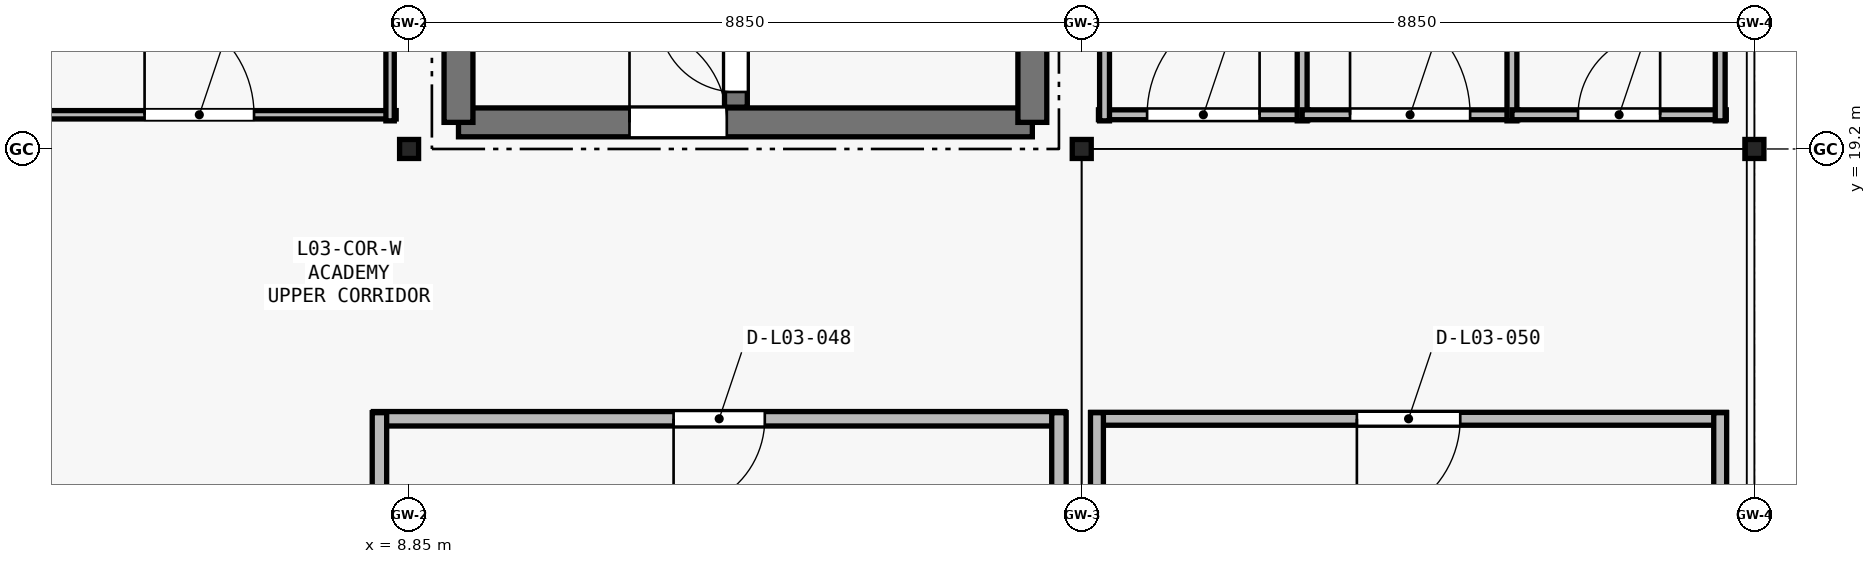
"""IFC4 building model, lengths in metres.
Left out: names, types, materials, properties, quantities, classifications, styles, units other than length and angle.
Written with IfcOpenShell. Run it as: python <this file> out.ifc"""

import sys

from ifc_helpers import new_model, si_unit, direction, frame, frame_2d, origin, origin_2d, place, context, subcontext, project, spatial, rectangle, i_section, extrude, element, fill, save


model = new_model("IFC4")
c1 = context("Model", 3, precision=1e-05, world=origin(), true_north=direction((0.0, 1.0)))
c2 = subcontext(c1, "Body", "Model", "MODEL_VIEW")
j1 = project(units=[si_unit("LENGTHUNIT", "METRE"), si_unit("PLANEANGLEUNIT", "RADIAN")], contexts=[c1])
p1 = place(None, origin())
s1 = spatial("IfcSite", under=j1, at=p1, CompositionType="ELEMENT")
p2 = place(p1, origin())
s2 = spatial("IfcBuilding", under=s1, at=p2, CompositionType="ELEMENT")
p3 = place(p2, frame((0.0, 0.0, 15.0)))
s3 = spatial("IfcBuildingStorey", under=s2, at=p3, CompositionType="ELEMENT", Elevation=15.0)
for number, where, z_axis, x_axis in (
    (1, (8.85, 19.2, 0.0), (0.0, 0.0, 1.0), (1.0, 0.0, 0.0)),
    (2, (17.7, 19.2, 0.0), (0.0, 0.0, 1.0), (1.0, 0.0, 0.0)),
    (3, (26.55, 19.2, 0.0), (0.0, 0.0, 1.0), (1.0, 0.0, 0.0)),
):
    element("IfcColumn", number, at=place(p3, frame(where, z_axis=z_axis, x_axis=x_axis)), inside=s3, PredefinedType="COLUMN", context=c2, shape_type="SweptSolid", body=[
        extrude(i_section(OverallWidth=0.25, OverallDepth=0.25, WebThickness=0.009, FlangeThickness=0.014, FilletRadius=0.016, at=origin_2d()), origin(), (0.0, 0.0, 1.0), 4.2),
    ])
p4 = place(p3, frame((9.5, 19.55, 0.0), z_axis=(0.0, 0.0, 1.0), x_axis=(1.0, 0.0, 0.0)))
e4 = element("IfcWall", 4, at=p4, inside=s3, PredefinedType="SHEAR", context=c2, shape_type="SweptSolid", body=[
    extrude(rectangle(XDim=7.55, YDim=0.38, at=frame_2d((3.775, 0.0))), origin(), (0.0, 0.0, 1.0), 4.2),
])
p5 = place(p4, frame((2.25, 0.0, 0.0)))
e5 = element("IfcOpeningElement", 5, at=p5, cuts=e4, PredefinedType="OPENING", context=c2, shape_type="SweptSolid", body=[
    extrude(rectangle(XDim=1.28, YDim=2.15, at=frame_2d((0.64, 1.075))), frame((0.0, 0.2, 0.0), z_axis=(0.0, -1.0, 0.0), x_axis=(1.0, 0.0, 0.0)), (0.0, 0.0, 1.0), 0.4),
])
for number, where, z_axis, x_axis in (
    (6, (9.5, 28.35, 0.0), (0.0, 0.0, 1.0), (0.0, -1.0, 0.0)),
    (7, (17.05, 19.55, 0.0), (0.0, 0.0, 1.0), (0.0, 1.0, 0.0)),
):
    element("IfcWall", number, at=place(p3, frame(where, z_axis=z_axis, x_axis=x_axis)), inside=s3, PredefinedType="SHEAR", context=c2, shape_type="SweptSolid", body=[
        extrude(rectangle(XDim=8.8, YDim=0.38, at=frame_2d((4.4, 0.0))), origin(), (0.0, 0.0, 1.0), 4.2),
    ])
p6 = place(p3, frame((13.15, 19.75, 0.0), z_axis=(0.0, 0.0, 1.0), x_axis=(0.0, 1.0, 0.0)))
e8 = element("IfcWall", 8, at=p6, inside=s3, PredefinedType="SHEAR", context=c2, shape_type="SweptSolid", body=[
    extrude(rectangle(XDim=8.4, YDim=0.3, at=frame_2d((4.2, 0.0))), origin(), (0.0, 0.0, 1.0), 4.2),
])
p7 = place(p6, frame((0.2, 0.0, 0.0)))
e9 = element("IfcOpeningElement", 9, at=p7, cuts=e8, PredefinedType="OPENING", context=c2, shape_type="SweptSolid", body=[
    extrude(rectangle(XDim=1.02, YDim=2.1, at=frame_2d((0.51, 1.05))), frame((0.0, 0.16, 0.0), z_axis=(0.0, -1.0, 0.0), x_axis=(1.0, 0.0, 0.0)), (0.0, 0.0, 1.0), 0.32),
])
p8 = place(p3, frame((17.92, 19.65, 0.0), z_axis=(0.0, 0.0, 1.0), x_axis=(1.0, 0.0, 0.0)))
e10 = element("IfcWall", 10, at=p8, inside=s3, PredefinedType="PARTITIONING", context=c2, shape_type="SweptSolid", body=[
    extrude(rectangle(XDim=2.76, YDim=0.13, at=frame_2d((1.38, 0.0))), origin(), (0.0, 0.0, 1.0), 3.72),
])
p9 = place(p8, frame((0.64, 0.0, 0.0)))
e11 = element("IfcOpeningElement", 11, at=p9, cuts=e10, PredefinedType="OPENING", context=c2, shape_type="SweptSolid", body=[
    extrude(rectangle(XDim=1.48, YDim=2.36, at=frame_2d((0.74, 1.18))), frame((0.0, 0.075, 0.0), z_axis=(0.0, -1.0, 0.0), x_axis=(1.0, 0.0, 0.0)), (0.0, 0.0, 1.0), 0.15),
])
p10 = place(p3, frame((20.6, 19.57, 0.0), z_axis=(0.0, 0.0, 1.0), x_axis=(0.0, 1.0, 0.0)))
e12 = element("IfcWall", 12, at=p10, inside=s3, PredefinedType="PARTITIONING", context=c2, shape_type="SweptSolid", body=[
    extrude(rectangle(XDim=4.51, YDim=0.13, at=frame_2d((2.255, 0.0))), origin(), (0.0, 0.0, 1.0), 3.55),
])
p11 = place(p3, frame((18.0, 24.08, 0.0), z_axis=(0.0, 0.0, 1.0), x_axis=(0.0, -1.0, 0.0)))
e13 = element("IfcWall", 13, at=p11, inside=s3, PredefinedType="PARTITIONING", context=c2, shape_type="SweptSolid", body=[
    extrude(rectangle(XDim=4.51, YDim=0.13, at=frame_2d((2.255, 0.0))), origin(), (0.0, 0.0, 1.0), 3.72),
])
p12 = place(p3, frame((20.6, 19.65, 0.0), z_axis=(0.0, 0.0, 1.0), x_axis=(1.0, 0.0, 0.0)))
e14 = element("IfcWall", 14, at=p12, inside=s3, PredefinedType="PARTITIONING", context=c2, shape_type="SweptSolid", body=[
    extrude(rectangle(XDim=2.84, YDim=0.13, at=frame_2d((1.42, 0.0))), origin(), (0.0, 0.0, 1.0), 3.72),
])
p13 = place(p12, frame((0.63, 0.0, 0.0)))
e15 = element("IfcOpeningElement", 15, at=p13, cuts=e14, PredefinedType="OPENING", context=c2, shape_type="SweptSolid", body=[
    extrude(rectangle(XDim=1.58, YDim=2.36, at=frame_2d((0.79, 1.18))), frame((0.0, 0.075, 0.0), z_axis=(0.0, -1.0, 0.0), x_axis=(1.0, 0.0, 0.0)), (0.0, 0.0, 1.0), 0.15),
])
p14 = place(p3, frame((23.36, 19.57, 0.0), z_axis=(0.0, 0.0, 1.0), x_axis=(0.0, 1.0, 0.0)))
e16 = element("IfcWall", 16, at=p14, inside=s3, PredefinedType="PARTITIONING", context=c2, shape_type="SweptSolid", body=[
    extrude(rectangle(XDim=4.51, YDim=0.13, at=frame_2d((2.255, 0.0))), origin(), (0.0, 0.0, 1.0), 3.72),
])
p15 = place(p3, frame((23.36, 19.65, 0.0), z_axis=(0.0, 0.0, 1.0), x_axis=(1.0, 0.0, 0.0)))
e17 = element("IfcWall", 17, at=p15, inside=s3, PredefinedType="PARTITIONING", context=c2, shape_type="SweptSolid", body=[
    extrude(rectangle(XDim=2.82, YDim=0.13, at=frame_2d((1.41, 0.0))), origin(), (0.0, 0.0, 1.0), 3.72),
])
p16 = place(p15, frame((0.87, 0.0, 0.0)))
e18 = element("IfcOpeningElement", 18, at=p16, cuts=e17, PredefinedType="OPENING", context=c2, shape_type="SweptSolid", body=[
    extrude(rectangle(XDim=1.08, YDim=2.22, at=frame_2d((0.54, 1.11))), frame((0.0, 0.075, 0.0), z_axis=(0.0, -1.0, 0.0), x_axis=(1.0, 0.0, 0.0)), (0.0, 0.0, 1.0), 0.15),
])
p17 = place(p3, frame((26.1, 19.57, 0.0), z_axis=(0.0, 0.0, 1.0), x_axis=(0.0, 1.0, 0.0)))
e19 = element("IfcWall", 19, at=p17, inside=s3, PredefinedType="PARTITIONING", context=c2, shape_type="SweptSolid", body=[
    extrude(rectangle(XDim=4.51, YDim=0.13, at=frame_2d((2.255, 0.0))), origin(), (0.0, 0.0, 1.0), 3.72),
])
p18 = place(p3, frame((17.48, 15.65, 0.0), z_axis=(0.0, 0.0, 1.0), x_axis=(-1.0, 0.0, 0.0)))
e20 = element("IfcWall", 20, at=p18, inside=s3, PredefinedType="PARTITIONING", context=c2, shape_type="SweptSolid", body=[
    extrude(rectangle(XDim=9.1, YDim=0.19, at=frame_2d((4.55, 0.0))), origin(), (0.0, 0.0, 1.0), 3.72),
])
p19 = place(p18, frame((3.95, 0.0, 0.0)))
e21 = element("IfcOpeningElement", 21, at=p19, cuts=e20, PredefinedType="OPENING", context=c2, shape_type="SweptSolid", body=[
    extrude(rectangle(XDim=1.2, YDim=2.1, at=frame_2d((0.6, 1.05))), frame((0.0, 0.105, 0.0), z_axis=(0.0, -1.0, 0.0), x_axis=(1.0, 0.0, 0.0)), (0.0, 0.0, 1.0), 0.21),
])
for number, where, z_axis, x_axis in (
    (22, (8.46, 15.73, 0.0), (0.0, 0.0, 1.0), (0.0, -1.0, 0.0)),
    (23, (17.4, 9.72, 0.0), (0.0, 0.0, 1.0), (0.0, 1.0, 0.0)),
):
    element("IfcWall", number, at=place(p3, frame(where, z_axis=z_axis, x_axis=x_axis)), inside=s3, PredefinedType="PARTITIONING", context=c2, shape_type="SweptSolid", body=[
        extrude(rectangle(XDim=6.01, YDim=0.19, at=frame_2d((3.005, 0.0))), origin(), (0.0, 0.0, 1.0), 3.72),
    ])
p20 = place(p3, frame((26.18, 15.65, 0.0), z_axis=(0.0, 0.0, 1.0), x_axis=(-1.0, 0.0, 0.0)))
e24 = element("IfcWall", 24, at=p20, inside=s3, PredefinedType="PARTITIONING", context=c2, shape_type="SweptSolid", body=[
    extrude(rectangle(XDim=8.36, YDim=0.17, at=frame_2d((4.18, 0.0))), origin(), (0.0, 0.0, 1.0), 3.72),
])
p21 = place(p20, frame((3.5, 0.0, 0.0)))
e25 = element("IfcOpeningElement", 25, at=p21, cuts=e24, PredefinedType="OPENING", context=c2, shape_type="SweptSolid", body=[
    extrude(rectangle(XDim=1.36, YDim=2.15, at=frame_2d((0.68, 1.075))), frame((0.0, 0.095, 0.0), z_axis=(0.0, -1.0, 0.0), x_axis=(1.0, 0.0, 0.0)), (0.0, 0.0, 1.0), 0.19),
])
p22 = place(p3, frame((26.1, 0.2, 0.0), z_axis=(0.0, 0.0, 1.0), x_axis=(0.0, 1.0, 0.0)))
e26 = element("IfcWall", 26, at=p22, inside=s3, PredefinedType="PARTITIONING", context=c2, shape_type="SweptSolid", body=[
    extrude(rectangle(XDim=15.53, YDim=0.17, at=frame_2d((7.765, 0.0))), origin(), (0.0, 0.0, 1.0), 3.72),
])
p23 = place(p3, frame((17.9, 15.73, 0.0), z_axis=(0.0, 0.0, 1.0), x_axis=(0.0, -1.0, 0.0)))
e27 = element("IfcWall", 27, at=p23, inside=s3, PredefinedType="PARTITIONING", context=c2, shape_type="SweptSolid", body=[
    extrude(rectangle(XDim=15.53, YDim=0.17, at=frame_2d((7.765, 0.0))), origin(), (0.0, 0.0, 1.0), 3.4),
])
p24 = place(p3, frame((0.2, 19.65, 0.0), z_axis=(0.0, 0.0, 1.0), x_axis=(1.0, 0.0, 0.0)))
e28 = element("IfcWall", 28, at=p24, inside=s3, PredefinedType="PARTITIONING", context=c2, shape_type="SweptSolid", body=[
    extrude(rectangle(XDim=8.48, YDim=0.11, at=frame_2d((4.24, 0.0))), origin(), (0.0, 0.0, 1.0), 3.72),
])
p25 = place(p24, frame((5.17, 0.0, 0.0)))
e29 = element("IfcOpeningElement", 29, at=p25, cuts=e28, PredefinedType="OPENING", context=c2, shape_type="SweptSolid", body=[
    extrude(rectangle(XDim=1.44, YDim=2.28, at=frame_2d((0.72, 1.14))), frame((0.0, 0.065, 0.0), z_axis=(0.0, -1.0, 0.0), x_axis=(1.0, 0.0, 0.0)), (0.0, 0.0, 1.0), 0.13),
])
p26 = place(p3, frame((8.6, 19.57, 0.0), z_axis=(0.0, 0.0, 1.0), x_axis=(0.0, 1.0, 0.0)))
e30 = element("IfcWall", 30, at=p26, inside=s3, PredefinedType="PARTITIONING", context=c2, shape_type="SweptSolid", body=[
    extrude(rectangle(XDim=9.03, YDim=0.11, at=frame_2d((4.515, 0.0))), origin(), (0.0, 0.0, 1.0), 3.72),
])
p27 = place(p5, origin())
e31 = element("IfcDoor", 31, at=p27, inside=s3, OperationType="SINGLE_SWING_LEFT", PredefinedType="DOOR", context=c2, shape_type="SweptSolid", body=[
    extrude(rectangle(XDim=1.28, YDim=2.15, at=frame_2d((0.64, 1.075))), frame((0.0, 0.025, 0.0), z_axis=(0.0, -1.0, 0.0), x_axis=(1.0, 0.0, 0.0)), (0.0, 0.0, 1.0), 0.05),
])
fill(e5, e31)
p28 = place(p7, origin())
e32 = element("IfcDoor", 32, at=p28, inside=s3, OperationType="SINGLE_SWING_RIGHT", PredefinedType="DOOR", context=c2, shape_type="SweptSolid", body=[
    extrude(rectangle(XDim=1.02, YDim=2.1, at=frame_2d((0.51, 1.05))), frame((0.0, 0.025, 0.0), z_axis=(0.0, -1.0, 0.0), x_axis=(1.0, 0.0, 0.0)), (0.0, 0.0, 1.0), 0.05),
])
fill(e9, e32)
p29 = place(p9, origin())
e33 = element("IfcDoor", 33, at=p29, inside=s3, OperationType="SINGLE_SWING_RIGHT", PredefinedType="DOOR", context=c2, shape_type="SweptSolid", body=[
    extrude(rectangle(XDim=1.48, YDim=2.36, at=frame_2d((0.74, 1.18))), frame((0.0, 0.025, 0.0), z_axis=(0.0, -1.0, 0.0), x_axis=(1.0, 0.0, 0.0)), (0.0, 0.0, 1.0), 0.05),
])
fill(e11, e33)
p30 = place(p13, origin())
e34 = element("IfcDoor", 34, at=p30, inside=s3, OperationType="SINGLE_SWING_LEFT", PredefinedType="DOOR", context=c2, shape_type="SweptSolid", body=[
    extrude(rectangle(XDim=1.58, YDim=2.36, at=frame_2d((0.79, 1.18))), frame((0.0, 0.025, 0.0), z_axis=(0.0, -1.0, 0.0), x_axis=(1.0, 0.0, 0.0)), (0.0, 0.0, 1.0), 0.05),
])
fill(e15, e34)
p31 = place(p16, origin())
e35 = element("IfcDoor", 35, at=p31, inside=s3, OperationType="SINGLE_SWING_RIGHT", PredefinedType="DOOR", context=c2, shape_type="SweptSolid", body=[
    extrude(rectangle(XDim=1.08, YDim=2.22, at=frame_2d((0.54, 1.11))), frame((0.0, 0.025, 0.0), z_axis=(0.0, -1.0, 0.0), x_axis=(1.0, 0.0, 0.0)), (0.0, 0.0, 1.0), 0.05),
])
fill(e18, e35)
p32 = place(p19, origin())
e36 = element("IfcDoor", 36, at=p32, inside=s3, OperationType="SINGLE_SWING_RIGHT", PredefinedType="DOOR", context=c2, shape_type="SweptSolid", body=[
    extrude(rectangle(XDim=1.2, YDim=2.1, at=frame_2d((0.6, 1.05))), frame((0.0, 0.025, 0.0), z_axis=(0.0, -1.0, 0.0), x_axis=(1.0, 0.0, 0.0)), (0.0, 0.0, 1.0), 0.05),
])
fill(e21, e36)
p33 = place(p21, origin())
e37 = element("IfcDoor", 37, at=p33, inside=s3, OperationType="SINGLE_SWING_RIGHT", PredefinedType="DOOR", context=c2, shape_type="SweptSolid", body=[
    extrude(rectangle(XDim=1.36, YDim=2.15, at=frame_2d((0.68, 1.075))), frame((0.0, 0.025, 0.0), z_axis=(0.0, -1.0, 0.0), x_axis=(1.0, 0.0, 0.0)), (0.0, 0.0, 1.0), 0.05),
])
fill(e25, e37)
p34 = place(p25, origin())
e38 = element("IfcDoor", 38, at=p34, inside=s3, OperationType="SINGLE_SWING_LEFT", PredefinedType="DOOR", context=c2, shape_type="SweptSolid", body=[
    extrude(rectangle(XDim=1.44, YDim=2.28, at=frame_2d((0.72, 1.14))), frame((0.0, 0.025, 0.0), z_axis=(0.0, -1.0, 0.0), x_axis=(1.0, 0.0, 0.0)), (0.0, 0.0, 1.0), 0.05),
])
fill(e29, e38)
save(model, sys.argv[1])
